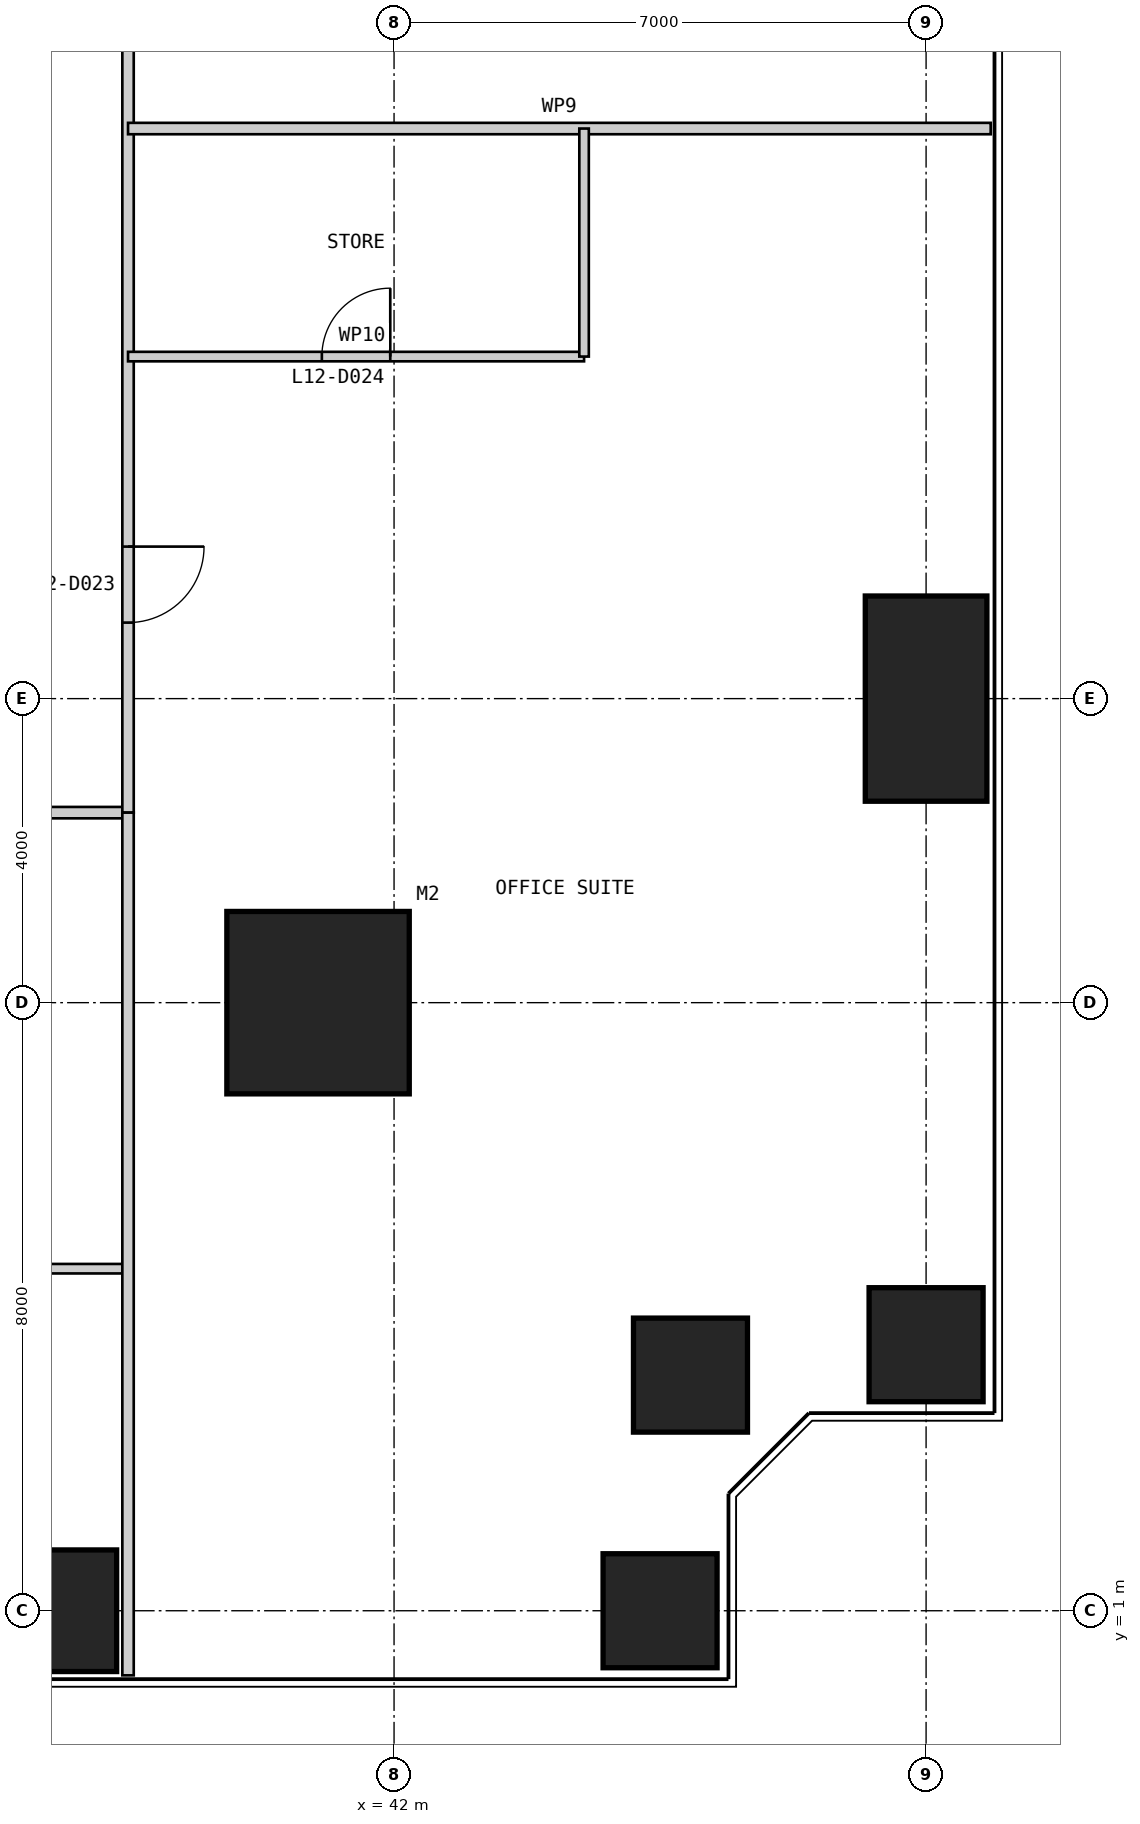
"""IFC4 building model, lengths in metres.
Left out: names, types, materials, properties, quantities, classifications, styles, units other than length and angle.
Written with IfcOpenShell. Run it as: python <this file> out.ifc"""

import sys

from ifc_helpers import new_model, si_unit, direction, frame, frame_2d, origin, origin_2d, place, context, subcontext, project, spatial, rectangle, extrude, element, fill, save


model = new_model("IFC4")
c1 = context("Model", 3, precision=1e-05, world=origin(), true_north=direction((0.0, 1.0)))
c2 = subcontext(c1, "Body", "Model", "MODEL_VIEW")
j1 = project(units=[si_unit("LENGTHUNIT", "METRE"), si_unit("PLANEANGLEUNIT", "RADIAN")], contexts=[c1])
p1 = place(None, origin())
s1 = spatial("IfcSite", under=j1, at=p1, CompositionType="ELEMENT")
p2 = place(p1, origin())
s2 = spatial("IfcBuilding", under=s1, at=p2, CompositionType="ELEMENT")
p3 = place(p2, frame((0.0, 0.0, 55.0)))
s3 = spatial("IfcBuildingStorey", under=s2, at=p3, CompositionType="ELEMENT", Elevation=55.0)
p4 = place(p3, frame((41.0, 9.0, 0.0), z_axis=(0.0, 0.0, 1.0), x_axis=(1.0, 0.0, 0.0)))
e1 = element("IfcColumn", 1, at=p4, inside=s3, PredefinedType="COLUMN", context=c2, shape_type="SweptSolid", body=[
    extrude(rectangle(XDim=2.4, YDim=2.4, at=origin_2d()), origin(), (0.0, 0.0, 1.0), 4.0),
])
p5 = place(p3, frame((37.0, 1.0, 0.0), z_axis=(0.0, 0.0, 1.0), x_axis=(1.0, 0.0, 0.0)))
e2 = element("IfcColumn", 2, at=p5, inside=s3, PredefinedType="COLUMN", context=c2, shape_type="SweptSolid", body=[
    extrude(rectangle(XDim=2.7, YDim=1.6, at=origin_2d()), origin(), (0.0, 0.0, 1.0), 4.0),
])
for number, where, z_axis, x_axis in (
    (3, (45.5, 1.0, 0.0), (0.0, 0.0, 1.0), (1.0, 0.0, 0.0)),
    (4, (45.9, 4.1, 0.0), (0.0, 0.0, 1.0), (1.0, 0.0, 0.0)),
    (5, (49.0, 4.5, 0.0), (0.0, 0.0, 1.0), (1.0, 0.0, 0.0)),
):
    element("IfcColumn", number, at=place(p3, frame(where, z_axis=z_axis, x_axis=x_axis)), inside=s3, PredefinedType="COLUMN", context=c2, shape_type="SweptSolid", body=[
        extrude(rectangle(XDim=1.5, YDim=1.5, at=origin_2d()), origin(), (0.0, 0.0, 1.0), 4.0),
    ])
p6 = place(p3, frame((49.0, 13.0, 0.0), z_axis=(0.0, 0.0, 1.0), x_axis=(1.0, 0.0, 0.0)))
e6 = element("IfcColumn", 6, at=p6, inside=s3, PredefinedType="COLUMN", context=c2, shape_type="SweptSolid", body=[
    extrude(rectangle(XDim=1.6, YDim=2.7, at=origin_2d()), origin(), (0.0, 0.0, 1.0), 4.0),
])
p7 = place(p3, frame((11.5, 11.5, 0.0), z_axis=(0.0, 0.0, 1.0), x_axis=(1.0, 0.0, 0.0)))
e7 = element("IfcWall", 7, at=p7, inside=s3, PredefinedType="PARTITIONING", context=c2, shape_type="SweptSolid", body=[
    extrude(rectangle(XDim=27.0, YDim=0.15, at=frame_2d((13.5, 0.0))), origin(), (0.0, 0.0, 1.0), 3.85),
])
p8 = place(p7, frame((2.5, 0.0, 0.0)))
e8 = element("IfcOpeningElement", 8, at=p8, cuts=e7, PredefinedType="OPENING", context=c2, shape_type="SweptSolid", body=[
    extrude(rectangle(XDim=1.0, YDim=2.2, at=frame_2d((0.5, 1.1))), frame((0.0, 0.085, 0.0), z_axis=(0.0, -1.0, 0.0), x_axis=(1.0, 0.0, 0.0)), (0.0, 0.0, 1.0), 0.17),
])
p9 = place(p7, frame((16.0, 0.0, 0.0)))
e9 = element("IfcOpeningElement", 9, at=p9, cuts=e7, PredefinedType="OPENING", context=c2, shape_type="SweptSolid", body=[
    extrude(rectangle(XDim=1.0, YDim=2.2, at=frame_2d((0.5, 1.1))), frame((0.0, 0.085, 0.0), z_axis=(0.0, -1.0, 0.0), x_axis=(1.0, 0.0, 0.0)), (0.0, 0.0, 1.0), 0.17),
])
p10 = place(p3, frame((32.5, 5.5, 0.0), z_axis=(0.0, 0.0, 1.0), x_axis=(1.0, 0.0, 0.0)))
e10 = element("IfcWall", 10, at=p10, inside=s3, PredefinedType="PARTITIONING", context=c2, shape_type="SweptSolid", body=[
    extrude(rectangle(XDim=6.0, YDim=0.125, at=frame_2d((3.0, 0.0))), origin(), (0.0, 0.0, 1.0), 3.85),
])
p11 = place(p3, frame((38.5, 11.5, 0.0), z_axis=(0.0, 0.0, 1.0), x_axis=(0.0, 1.0, 0.0)))
e11 = element("IfcWall", 11, at=p11, inside=s3, PredefinedType="PARTITIONING", context=c2, shape_type="SweptSolid", body=[
    extrude(rectangle(XDim=27.0, YDim=0.15, at=frame_2d((13.5, 0.0))), origin(), (0.0, 0.0, 1.0), 3.85),
])
p12 = place(p11, frame((2.5, 0.0, 0.0)))
e12 = element("IfcOpeningElement", 12, at=p12, cuts=e11, PredefinedType="OPENING", context=c2, shape_type="SweptSolid", body=[
    extrude(rectangle(XDim=1.0, YDim=2.2, at=frame_2d((0.5, 1.1))), frame((0.0, 0.085, 0.0), z_axis=(0.0, -1.0, 0.0), x_axis=(1.0, 0.0, 0.0)), (0.0, 0.0, 1.0), 0.17),
])
p13 = place(p11, frame((16.0, 0.0, 0.0)))
e13 = element("IfcOpeningElement", 13, at=p13, cuts=e11, PredefinedType="OPENING", context=c2, shape_type="SweptSolid", body=[
    extrude(rectangle(XDim=1.0, YDim=2.2, at=frame_2d((0.5, 1.1))), frame((0.0, 0.085, 0.0), z_axis=(0.0, -1.0, 0.0), x_axis=(1.0, 0.0, 0.0)), (0.0, 0.0, 1.0), 0.17),
])
p14 = place(p3, frame((38.5, 0.15, 0.0), z_axis=(0.0, 0.0, 1.0), x_axis=(0.0, 1.0, 0.0)))
e14 = element("IfcWall", 14, at=p14, inside=s3, PredefinedType="PARTITIONING", context=c2, shape_type="SweptSolid", body=[
    extrude(rectangle(XDim=11.35, YDim=0.15, at=frame_2d((5.675, 0.0))), origin(), (0.0, 0.0, 1.0), 3.85),
])
p15 = place(p3, frame((44.5, 17.5, 0.0), z_axis=(0.0, 0.0, 1.0), x_axis=(-1.0, 0.0, 0.0)))
e15 = element("IfcWall", 15, at=p15, inside=s3, PredefinedType="PARTITIONING", context=c2, shape_type="SweptSolid", body=[
    extrude(rectangle(XDim=6.0, YDim=0.125, at=frame_2d((3.0, 0.0))), origin(), (0.0, 0.0, 1.0), 3.85),
])
p16 = place(p15, frame((2.55, 0.0, 0.0)))
e16 = element("IfcOpeningElement", 16, at=p16, cuts=e15, PredefinedType="OPENING", context=c2, shape_type="SweptSolid", body=[
    extrude(rectangle(XDim=0.9, YDim=2.2, at=frame_2d((0.45, 1.1))), frame((0.0, 0.073, 0.0), z_axis=(0.0, -1.0, 0.0), x_axis=(1.0, 0.0, 0.0)), (0.0, 0.0, 1.0), 0.145),
])
p17 = place(p3, frame((49.85, 20.5, 0.0), z_axis=(0.0, 0.0, 1.0), x_axis=(-1.0, 0.0, 0.0)))
e17 = element("IfcWall", 17, at=p17, inside=s3, PredefinedType="PARTITIONING", context=c2, shape_type="SweptSolid", body=[
    extrude(rectangle(XDim=11.35, YDim=0.15, at=frame_2d((5.675, 0.0))), origin(), (0.0, 0.0, 1.0), 3.85),
])
p18 = place(p3, frame((44.5, 17.5, 0.0), z_axis=(0.0, 0.0, 1.0), x_axis=(0.0, 1.0, 0.0)))
e18 = element("IfcWall", 18, at=p18, inside=s3, PredefinedType="PARTITIONING", context=c2, shape_type="SweptSolid", body=[
    extrude(rectangle(XDim=3.0, YDim=0.125, at=frame_2d((1.5, 0.0))), origin(), (0.0, 0.0, 1.0), 3.85),
])
p19 = place(p12, frame((1.0, 0.0, 0.0), z_axis=(0.0, 0.0, 1.0), x_axis=(-1.0, 0.0, 0.0)))
e19 = element("IfcDoor", 19, at=p19, inside=s3, OperationType="SINGLE_SWING_LEFT", PredefinedType="DOOR", context=c2, shape_type="SweptSolid", body=[
    extrude(rectangle(XDim=1.0, YDim=2.2, at=frame_2d((0.5, 1.1))), frame((0.0, 0.025, 0.0), z_axis=(0.0, -1.0, 0.0), x_axis=(1.0, 0.0, 0.0)), (0.0, 0.0, 1.0), 0.05),
])
fill(e12, e19)
p20 = place(p16, frame((0.9, 0.0, 0.0), z_axis=(0.0, 0.0, 1.0), x_axis=(-1.0, 0.0, 0.0)))
e20 = element("IfcDoor", 20, at=p20, inside=s3, OperationType="SINGLE_SWING_RIGHT", PredefinedType="DOOR", context=c2, shape_type="SweptSolid", body=[
    extrude(rectangle(XDim=0.9, YDim=2.2, at=frame_2d((0.45, 1.1))), frame((0.0, 0.025, 0.0), z_axis=(0.0, -1.0, 0.0), x_axis=(1.0, 0.0, 0.0)), (0.0, 0.0, 1.0), 0.05),
])
fill(e16, e20)
save(model, sys.argv[1])
